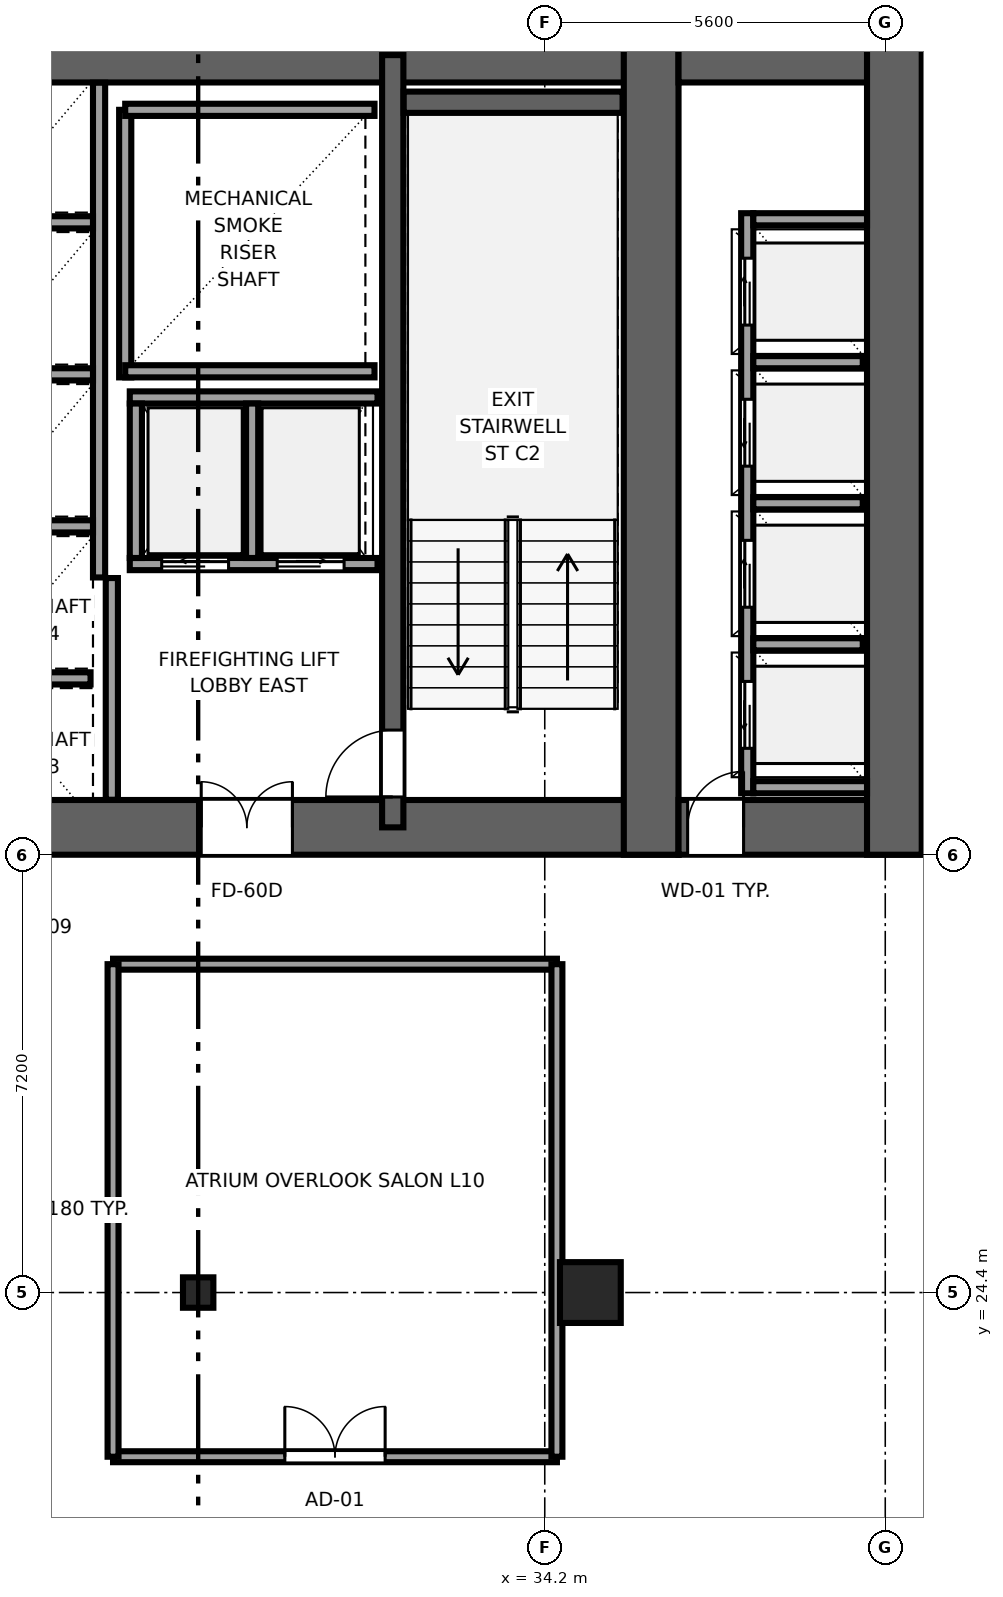
"""IFC4 building model, lengths in metres.
Left out: names, types, materials, properties, quantities, classifications, styles, units other than length and angle.
Written with IfcOpenShell. Run it as: python <this file> out.ifc"""

import sys

from ifc_helpers import new_model, si_unit, direction, frame, frame_2d, origin, origin_2d, place, context, subcontext, project, spatial, rectangle, i_section, extrude, source, transform, mapped, element, fill, save


model = new_model("IFC4")
c1 = context("Model", 3, precision=1e-05, world=origin(), true_north=direction((0.0, 1.0)))
c2 = subcontext(c1, "Body", "Model", "MODEL_VIEW")
j1 = project(units=[si_unit("LENGTHUNIT", "METRE"), si_unit("PLANEANGLEUNIT", "RADIAN")], contexts=[c1])
p1 = place(None, origin())
s1 = spatial("IfcSite", under=j1, at=p1, CompositionType="ELEMENT")
p2 = place(p1, origin())
s2 = spatial("IfcBuilding", under=s1, at=p2, CompositionType="ELEMENT")
p3 = place(p2, frame((0.0, 0.0, 46.2)))
s3 = spatial("IfcBuildingStorey", under=s2, at=p3, CompositionType="ELEMENT", Elevation=46.2)
p4 = place(p3, frame((9.6, 32.05, 0.0), z_axis=(0.0, 0.0, 1.0), x_axis=(1.0, 0.0, 0.0)))
e1 = element("IfcWall", 1, at=p4, inside=s3, PredefinedType="SHEAR", context=c2, shape_type="SweptSolid", body=[
    extrude(rectangle(XDim=26.8, YDim=0.9, at=frame_2d((13.4, 0.0))), origin(), (0.0, 0.0, 1.0), 3.55),
])
p5 = place(p4, frame((6.52, 0.0, 0.0), z_axis=(0.0, 0.0, 1.0), x_axis=(-1.0, 0.0, 0.0)))
e2 = element("IfcOpeningElement", 2, at=p5, cuts=e1, PredefinedType="OPENING", context=c2, shape_type="SweptSolid", body=[
    extrude(rectangle(XDim=1.5, YDim=2.04, at=frame_2d((0.75, 1.02))), frame((0.0, 0.46, 0.0), z_axis=(0.0, -1.0, 0.0), x_axis=(1.0, 0.0, 0.0)), (0.0, 0.0, 1.0), 0.92),
])
p6 = place(p4, frame((14.15, 0.0, 0.0), z_axis=(0.0, 0.0, 1.0), x_axis=(-1.0, 0.0, 0.0)))
e3 = element("IfcOpeningElement", 3, at=p6, cuts=e1, PredefinedType="OPENING", context=c2, shape_type="SweptSolid", body=[
    extrude(rectangle(XDim=1.5, YDim=2.04, at=frame_2d((0.75, 1.02))), frame((0.0, 0.46, 0.0), z_axis=(0.0, -1.0, 0.0), x_axis=(1.0, 0.0, 0.0)), (0.0, 0.0, 1.0), 0.92),
])
p7 = place(p4, frame((20.45, 0.0, 0.0), z_axis=(0.0, 0.0, 1.0), x_axis=(-1.0, 0.0, 0.0)))
e4 = element("IfcOpeningElement", 4, at=p7, cuts=e1, PredefinedType="OPENING", context=c2, shape_type="SweptSolid", body=[
    extrude(rectangle(XDim=1.5, YDim=2.04, at=frame_2d((0.75, 1.02))), frame((0.0, 0.46, 0.0), z_axis=(0.0, -1.0, 0.0), x_axis=(1.0, 0.0, 0.0)), (0.0, 0.0, 1.0), 0.92),
])
p8 = place(p4, frame((8.57, 0.0, 0.0), z_axis=(0.0, 0.0, 1.0), x_axis=(-1.0, 0.0, 0.0)))
e5 = element("IfcOpeningElement", 5, at=p8, cuts=e1, PredefinedType="OPENING", context=c2, shape_type="SweptSolid", body=[
    extrude(rectangle(XDim=0.82, YDim=2.01, at=frame_2d((0.41, 1.005))), frame((0.0, 0.46, 0.0), z_axis=(0.0, -1.0, 0.0), x_axis=(1.0, 0.0, 0.0)), (0.0, 0.0, 1.0), 0.92),
])
p9 = place(p3, frame((9.6, 44.75, 0.0), z_axis=(0.0, 0.0, 1.0), x_axis=(1.0, 0.0, 0.0)))
e6 = element("IfcWall", 6, at=p9, inside=s3, PredefinedType="SHEAR", context=c2, shape_type="SweptSolid", body=[
    extrude(rectangle(XDim=26.8, YDim=0.9, at=frame_2d((13.4, 0.0))), origin(), (0.0, 0.0, 1.0), 3.55),
])
p10 = place(p3, frame((35.95, 31.6, 0.0), z_axis=(0.0, 0.0, 1.0), x_axis=(0.0, 1.0, 0.0)))
e7 = element("IfcWall", 7, at=p10, inside=s3, PredefinedType="SHEAR", context=c2, shape_type="SweptSolid", body=[
    extrude(rectangle(XDim=13.6, YDim=0.9, at=frame_2d((6.8, 0.0))), origin(), (0.0, 0.0, 1.0), 3.55),
])
p11 = place(p3, frame((31.7, 32.05, 0.0), z_axis=(0.0, 0.0, 1.0), x_axis=(0.0, 1.0, 0.0)))
e8 = element("IfcWall", 8, at=p11, inside=s3, PredefinedType="SHEAR", context=c2, shape_type="SweptSolid", body=[
    extrude(rectangle(XDim=12.7, YDim=0.35, at=frame_2d((6.35, 0.0))), origin(), (0.0, 0.0, 1.0), 3.55),
])
p12 = place(p11, frame((1.6, 0.0, 0.0), z_axis=(0.0, 0.0, 1.0), x_axis=(-1.0, 0.0, 0.0)))
e9 = element("IfcOpeningElement", 9, at=p12, cuts=e8, PredefinedType="OPENING", context=c2, shape_type="SweptSolid", body=[
    extrude(rectangle(XDim=1.1, YDim=2.12, at=frame_2d((0.55, 1.06))), frame((0.0, 0.185, 0.0), z_axis=(0.0, -1.0, 0.0), x_axis=(1.0, 0.0, 0.0)), (0.0, 0.0, 1.0), 0.37),
])
p13 = place(p3, frame((36.4, 32.05, 0.0), z_axis=(0.0, 0.0, 1.0), x_axis=(1.0, 0.0, 0.0)))
e10 = element("IfcWall", 10, at=p13, inside=s3, PredefinedType="SHEAR", context=c2, shape_type="SweptSolid", body=[
    extrude(rectangle(XDim=4.0, YDim=0.9, at=frame_2d((2.0, 0.0))), origin(), (0.0, 0.0, 1.0), 3.55),
])
p14 = place(p13, frame((1.07, 0.0, 0.0), z_axis=(0.0, 0.0, 1.0), x_axis=(-1.0, 0.0, 0.0)))
e11 = element("IfcOpeningElement", 11, at=p14, cuts=e10, PredefinedType="OPENING", context=c2, shape_type="SweptSolid", body=[
    extrude(rectangle(XDim=0.92, YDim=2.01, at=frame_2d((0.46, 1.005))), frame((0.0, 0.46, 0.0), z_axis=(0.0, -1.0, 0.0), x_axis=(1.0, 0.0, 0.0)), (0.0, 0.0, 1.0), 0.92),
])
p15 = place(p3, frame((36.4, 44.75, 0.0), z_axis=(0.0, 0.0, 1.0), x_axis=(1.0, 0.0, 0.0)))
e12 = element("IfcWall", 12, at=p15, inside=s3, PredefinedType="SHEAR", context=c2, shape_type="SweptSolid", body=[
    extrude(rectangle(XDim=4.0, YDim=0.9, at=frame_2d((2.0, 0.0))), origin(), (0.0, 0.0, 1.0), 3.55),
])
p16 = place(p3, frame((39.95, 31.6, 0.0), z_axis=(0.0, 0.0, 1.0), x_axis=(0.0, 1.0, 0.0)))
e13 = element("IfcWall", 13, at=p16, inside=s3, PredefinedType="SHEAR", context=c2, shape_type="SweptSolid", body=[
    extrude(rectangle(XDim=13.6, YDim=0.9, at=frame_2d((6.8, 0.0))), origin(), (0.0, 0.0, 1.0), 3.55),
])
p17 = place(p3, frame((31.88, 43.975, 0.0), z_axis=(0.0, 0.0, 1.0), x_axis=(1.0, 0.0, 0.0)))
e14 = element("IfcWall", 14, at=p17, inside=s3, PredefinedType="SHEAR", context=c2, shape_type="SweptSolid", body=[
    extrude(rectangle(XDim=3.6, YDim=0.35, at=frame_2d((1.8, 0.0))), origin(), (0.0, 0.0, 1.0), 3.55),
])
m1 = source(origin(), c2, "Body", "SweptSolid", [
    extrude(rectangle(XDim=1.0, YDim=1.0, at=origin_2d()), origin(), (0.0, 0.0, 1.0), 3.55),
])
p18 = place(p3, frame((34.95, 24.4, 0.0), z_axis=(0.0, 0.0, 1.0), x_axis=(1.0, 0.0, 0.0)))
e15 = element("IfcColumn", 15, at=p18, inside=s3, PredefinedType="COLUMN", context=c2, shape_type="MappedRepresentation", body=[
    mapped(m1, transform((0.0, 0.0, 0.0), x_axis=(1.0, 0.0, 0.0), y_axis=(0.0, 1.0, 0.0), z_axis=(0.0, 0.0, 1.0), scale=1.0)),
])
m2 = source(origin(), c2, "Body", "SweptSolid", [
    extrude(i_section(OverallWidth=0.5, OverallDepth=0.5, WebThickness=0.028, FlangeThickness=0.045, at=origin_2d()), origin(), (0.0, 0.0, 1.0), 3.55),
])
p19 = place(p3, frame((28.5, 24.4, 0.0), z_axis=(0.0, 0.0, 1.0), x_axis=(1.0, 0.0, 0.0)))
e16 = element("IfcColumn", 16, at=p19, inside=s3, PredefinedType="COLUMN", context=c2, shape_type="MappedRepresentation", body=[
    mapped(m2, transform((0.0, 0.0, 0.0), x_axis=(1.0, 0.0, 0.0), y_axis=(0.0, 1.0, 0.0), z_axis=(0.0, 0.0, 1.0), scale=1.0)),
])
p20 = place(p3, frame((27.3, 39.45, 0.0), z_axis=(0.0, 0.0, 1.0), x_axis=(0.0, 1.0, 0.0)))
e17 = element("IfcWall", 17, at=p20, inside=s3, PredefinedType="SOLIDWALL", context=c2, shape_type="SweptSolid", body=[
    extrude(rectangle(XDim=4.4, YDim=0.2, at=frame_2d((2.2, 0.0))), origin(), (0.0, 0.0, 1.0), 3.37),
])
for number, where, z_axis, x_axis in (
    (18, (27.3, 39.55, 0.0), (0.0, 0.0, 1.0), (1.0, 0.0, 0.0)),
    (19, (27.3, 43.85, 0.0), (0.0, 0.0, 1.0), (1.0, 0.0, 0.0)),
):
    element("IfcWall", number, at=place(p3, frame(where, z_axis=z_axis, x_axis=x_axis)), inside=s3, PredefinedType="SOLIDWALL", context=c2, shape_type="SweptSolid", body=[
        extrude(rectangle(XDim=4.1, YDim=0.2, at=frame_2d((2.05, 0.0))), origin(), (0.0, 0.0, 1.0), 3.37),
    ])
p21 = place(p3, frame((27.08, 32.504, 0.0), z_axis=(0.0, 0.0, 1.0), x_axis=(0.0, 1.0, 0.0)))
e20 = element("IfcWall", 20, at=p21, inside=s3, PredefinedType="SOLIDWALL", context=c2, shape_type="SweptSolid", body=[
    extrude(rectangle(XDim=3.646, YDim=0.2, at=frame_2d((1.823, 0.0))), origin(), (0.0, 0.0, 1.0), 3.37),
])
p22 = place(p3, frame((27.375, 36.38, 0.0), z_axis=(0.0, 0.0, 1.0), x_axis=(1.0, 0.0, 0.0)))
e21 = element("IfcWall", 21, at=p22, inside=s3, PredefinedType="SOLIDWALL", context=c2, shape_type="SweptSolid", body=[
    extrude(rectangle(XDim=4.075, YDim=0.2, at=frame_2d((2.038, 0.0))), origin(), (0.0, 0.0, 1.0), 3.37),
])
p23 = place(p22, frame((0.525, 0.0, 0.0)))
e22 = element("IfcOpeningElement", 22, at=p23, cuts=e21, PredefinedType="OPENING", context=c2, shape_type="SweptSolid", body=[
    extrude(rectangle(XDim=1.1, YDim=2.12, at=frame_2d((0.55, 1.06))), frame((0.0, 0.11, 0.0), z_axis=(0.0, -1.0, 0.0), x_axis=(1.0, 0.0, 0.0)), (0.0, 0.0, 1.0), 0.22),
])
p24 = place(p22, frame((2.425, 0.0, 0.0)))
e23 = element("IfcOpeningElement", 23, at=p24, cuts=e21, PredefinedType="OPENING", context=c2, shape_type="SweptSolid", body=[
    extrude(rectangle(XDim=1.1, YDim=2.12, at=frame_2d((0.55, 1.06))), frame((0.0, 0.11, 0.0), z_axis=(0.0, -1.0, 0.0), x_axis=(1.0, 0.0, 0.0)), (0.0, 0.0, 1.0), 0.22),
])
p25 = place(p3, frame((27.375, 39.12, 0.0), z_axis=(0.0, 0.0, 1.0), x_axis=(1.0, 0.0, 0.0)))
e24 = element("IfcWall", 24, at=p25, inside=s3, PredefinedType="SOLIDWALL", context=c2, shape_type="SweptSolid", body=[
    extrude(rectangle(XDim=4.075, YDim=0.2, at=frame_2d((2.038, 0.0))), origin(), (0.0, 0.0, 1.0), 3.37),
])
for number, where, z_axis, x_axis in (
    (25, (27.475, 36.48, 0.0), (0.0, 0.0, 1.0), (0.0, 1.0, 0.0)),
    (26, (29.387, 36.48, 0.0), (0.0, 0.0, 1.0), (0.0, 1.0, 0.0)),
):
    element("IfcWall", number, at=place(p3, frame(where, z_axis=z_axis, x_axis=x_axis)), inside=s3, PredefinedType="SOLIDWALL", context=c2, shape_type="SweptSolid", body=[
        extrude(rectangle(XDim=2.54, YDim=0.2, at=frame_2d((1.27, 0.0))), origin(), (0.0, 0.0, 1.0), 3.37),
    ])
p26 = place(p3, frame((26.87, 36.16, 0.0), z_axis=(0.0, 0.0, 1.0), x_axis=(0.0, 1.0, 0.0)))
e27 = element("IfcWall", 27, at=p26, inside=s3, PredefinedType="SOLIDWALL", context=c2, shape_type="SweptSolid", body=[
    extrude(rectangle(XDim=8.136, YDim=0.2, at=frame_2d((4.068, 0.0))), origin(), (0.0, 0.0, 1.0), 3.37),
])
p27 = place(p3, frame((24.93, 34.5, 0.0), z_axis=(0.0, 0.0, 1.0), x_axis=(1.0, 0.0, 0.0)))
e28 = element("IfcWall", 28, at=p27, inside=s3, PredefinedType="SOLIDWALL", context=c2, shape_type="SweptSolid", body=[
    extrude(rectangle(XDim=1.8, YDim=0.2, at=frame_2d((0.9, 0.0))), origin(), (0.0, 0.0, 1.0), 3.37),
])
for number, where, z_axis, x_axis in (
    (29, (24.93, 37.0, 0.0), (0.0, 0.0, 1.0), (1.0, 0.0, 0.0)),
    (30, (24.93, 39.5, 0.0), (0.0, 0.0, 1.0), (1.0, 0.0, 0.0)),
    (31, (24.93, 42.0, 0.0), (0.0, 0.0, 1.0), (1.0, 0.0, 0.0)),
):
    element("IfcWall", number, at=place(p3, frame(where, z_axis=z_axis, x_axis=x_axis)), inside=s3, PredefinedType="SOLIDWALL", context=c2, shape_type="SweptSolid", body=[
        extrude(rectangle(XDim=1.84, YDim=0.2, at=frame_2d((0.92, 0.0))), origin(), (0.0, 0.0, 1.0), 3.37),
    ])
p28 = place(p3, frame((37.53, 32.61, 0.0), z_axis=(0.0, 0.0, 1.0), x_axis=(0.0, 1.0, 0.0)))
e32 = element("IfcWall", 32, at=p28, inside=s3, PredefinedType="SOLIDWALL", context=c2, shape_type="SweptSolid", body=[
    extrude(rectangle(XDim=9.54, YDim=0.2, at=frame_2d((4.77, 0.0))), origin(), (0.0, 0.0, 1.0), 3.37),
])
p29 = place(p28, frame((0.74, 0.0, 0.0)))
e33 = element("IfcOpeningElement", 33, at=p29, cuts=e32, PredefinedType="OPENING", context=c2, shape_type="SweptSolid", body=[
    extrude(rectangle(XDim=1.1, YDim=2.12, at=frame_2d((0.55, 1.06))), frame((0.0, 0.11, 0.0), z_axis=(0.0, -1.0, 0.0), x_axis=(1.0, 0.0, 0.0)), (0.0, 0.0, 1.0), 0.22),
])
p30 = place(p28, frame((3.06, 0.0, 0.0)))
e34 = element("IfcOpeningElement", 34, at=p30, cuts=e32, PredefinedType="OPENING", context=c2, shape_type="SweptSolid", body=[
    extrude(rectangle(XDim=1.1, YDim=2.12, at=frame_2d((0.55, 1.06))), frame((0.0, 0.11, 0.0), z_axis=(0.0, -1.0, 0.0), x_axis=(1.0, 0.0, 0.0)), (0.0, 0.0, 1.0), 0.22),
])
p31 = place(p28, frame((5.38, 0.0, 0.0)))
e35 = element("IfcOpeningElement", 35, at=p31, cuts=e32, PredefinedType="OPENING", context=c2, shape_type="SweptSolid", body=[
    extrude(rectangle(XDim=1.1, YDim=2.12, at=frame_2d((0.55, 1.06))), frame((0.0, 0.11, 0.0), z_axis=(0.0, -1.0, 0.0), x_axis=(1.0, 0.0, 0.0)), (0.0, 0.0, 1.0), 0.22),
])
p32 = place(p28, frame((7.7, 0.0, 0.0)))
e36 = element("IfcOpeningElement", 36, at=p32, cuts=e32, PredefinedType="OPENING", context=c2, shape_type="SweptSolid", body=[
    extrude(rectangle(XDim=1.1, YDim=2.12, at=frame_2d((0.55, 1.06))), frame((0.0, 0.11, 0.0), z_axis=(0.0, -1.0, 0.0), x_axis=(1.0, 0.0, 0.0)), (0.0, 0.0, 1.0), 0.22),
])
for number, where, z_axis, x_axis in (
    (37, (37.63, 32.71, 0.0), (0.0, 0.0, 1.0), (1.0, 0.0, 0.0)),
    (38, (37.63, 42.05, 0.0), (0.0, 0.0, 1.0), (1.0, 0.0, 0.0)),
):
    element("IfcWall", number, at=place(p3, frame(where, z_axis=z_axis, x_axis=x_axis)), inside=s3, PredefinedType="SOLIDWALL", context=c2, shape_type="SweptSolid", body=[
        extrude(rectangle(XDim=1.87, YDim=0.2, at=frame_2d((0.935, 0.0))), origin(), (0.0, 0.0, 1.0), 3.37),
    ])
for number, where, z_axis, x_axis in (
    (39, (37.63, 35.06, 0.0), (0.0, 0.0, 1.0), (1.0, 0.0, 0.0)),
    (40, (37.63, 37.38, 0.0), (0.0, 0.0, 1.0), (1.0, 0.0, 0.0)),
    (41, (37.63, 39.7, 0.0), (0.0, 0.0, 1.0), (1.0, 0.0, 0.0)),
):
    element("IfcWall", number, at=place(p3, frame(where, z_axis=z_axis, x_axis=x_axis)), inside=s3, PredefinedType="SOLIDWALL", context=c2, shape_type="SweptSolid", body=[
        extrude(rectangle(XDim=1.8, YDim=0.2, at=frame_2d((0.9, 0.0))), origin(), (0.0, 0.0, 1.0), 3.37),
    ])
p33 = place(p3, frame((27.1, 21.7, 0.0), z_axis=(0.0, 0.0, 1.0), x_axis=(1.0, 0.0, 0.0)))
e42 = element("IfcWall", 42, at=p33, inside=s3, PredefinedType="PARTITIONING", context=c2, shape_type="SweptSolid", body=[
    extrude(rectangle(XDim=7.3, YDim=0.18, at=frame_2d((3.65, 0.0))), origin(), (0.0, 0.0, 1.0), 3.37),
])
p34 = place(p33, frame((2.825, 0.0, 0.0)))
e43 = element("IfcOpeningElement", 43, at=p34, cuts=e42, PredefinedType="OPENING", context=c2, shape_type="SweptSolid", body=[
    extrude(rectangle(XDim=1.65, YDim=2.15, at=frame_2d((0.825, 1.075))), frame((0.0, 0.1, 0.0), z_axis=(0.0, -1.0, 0.0), x_axis=(1.0, 0.0, 0.0)), (0.0, 0.0, 1.0), 0.2),
])
p35 = place(p3, frame((27.1, 29.8, 0.0), z_axis=(0.0, 0.0, 1.0), x_axis=(1.0, 0.0, 0.0)))
e44 = element("IfcWall", 44, at=p35, inside=s3, PredefinedType="PARTITIONING", context=c2, shape_type="SweptSolid", body=[
    extrude(rectangle(XDim=7.3, YDim=0.18, at=frame_2d((3.65, 0.0))), origin(), (0.0, 0.0, 1.0), 3.37),
])
for number, where, z_axis, x_axis in (
    (45, (27.1, 21.7, 0.0), (0.0, 0.0, 1.0), (0.0, 1.0, 0.0)),
    (46, (34.4, 21.7, 0.0), (0.0, 0.0, 1.0), (0.0, 1.0, 0.0)),
):
    element("IfcWall", number, at=place(p3, frame(where, z_axis=z_axis, x_axis=x_axis)), inside=s3, PredefinedType="PARTITIONING", context=c2, shape_type="SweptSolid", body=[
        extrude(rectangle(XDim=8.1, YDim=0.18, at=frame_2d((4.05, 0.0))), origin(), (0.0, 0.0, 1.0), 3.37),
    ])
m3 = source(origin(), c2, "Body", "SweptSolid", [
    extrude(rectangle(XDim=1.1, YDim=2.12, at=frame_2d((0.55, 1.06))), frame((0.0, 0.025, 0.0), z_axis=(0.0, -1.0, 0.0), x_axis=(1.0, 0.0, 0.0)), (0.0, 0.0, 1.0), 0.05),
])
p36 = place(p12, origin())
e47 = element("IfcDoor", 47, at=p36, inside=s3, OperationType="SINGLE_SWING_LEFT", PredefinedType="DOOR", context=c2, shape_type="MappedRepresentation", body=[
    mapped(m3, transform((0.0, 0.0, 0.0), x_axis=(1.0, 0.0, 0.0), y_axis=(0.0, 1.0, 0.0), z_axis=(0.0, 0.0, 1.0), scale=1.0)),
])
fill(e9, e47)
m4 = source(origin(), c2, "Body", "SweptSolid", [
    extrude(rectangle(XDim=1.5, YDim=2.04, at=frame_2d((0.75, 1.02))), frame((0.0, 0.025, 0.0), z_axis=(0.0, -1.0, 0.0), x_axis=(1.0, 0.0, 0.0)), (0.0, 0.0, 1.0), 0.05),
])
p37 = place(p7, origin())
e48 = element("IfcDoor", 48, at=p37, inside=s3, OperationType="DOUBLE_DOOR_SINGLE_SWING", PredefinedType="DOOR", context=c2, shape_type="MappedRepresentation", body=[
    mapped(m4, transform((0.0, 0.0, 0.0), x_axis=(1.0, 0.0, 0.0), y_axis=(0.0, 1.0, 0.0), z_axis=(0.0, 0.0, 1.0), scale=1.0)),
])
fill(e4, e48)
m5 = source(origin(), c2, "Body", "SweptSolid", [
    extrude(rectangle(XDim=0.92, YDim=2.01, at=frame_2d((0.46, 1.005))), frame((0.0, 0.025, 0.0), z_axis=(0.0, -1.0, 0.0), x_axis=(1.0, 0.0, 0.0)), (0.0, 0.0, 1.0), 0.05),
])
p38 = place(p14, origin())
e49 = element("IfcDoor", 49, at=p38, inside=s3, OperationType="SINGLE_SWING_RIGHT", PredefinedType="DOOR", context=c2, shape_type="MappedRepresentation", body=[
    mapped(m5, transform((0.0, 0.0, 0.0), x_axis=(1.0, 0.0, 0.0), y_axis=(0.0, 1.0, 0.0), z_axis=(0.0, 0.0, 1.0), scale=1.0)),
])
fill(e11, e49)
m6 = source(origin(), c2, "Body", "SweptSolid", [
    extrude(rectangle(XDim=1.1, YDim=2.12, at=frame_2d((0.55, 1.06))), frame((0.0, 0.025, 0.0), z_axis=(0.0, -1.0, 0.0), x_axis=(1.0, 0.0, 0.0)), (0.0, 0.0, 1.0), 0.05),
])
p39 = place(p23, origin())
e50 = element("IfcDoor", 50, at=p39, inside=s3, OperationType="SLIDING_TO_LEFT", PredefinedType="DOOR", context=c2, shape_type="MappedRepresentation", body=[
    mapped(m6, transform((0.0, 0.0, 0.0), x_axis=(1.0, 0.0, 0.0), y_axis=(0.0, 1.0, 0.0), z_axis=(0.0, 0.0, 1.0), scale=1.0)),
])
fill(e22, e50)
p40 = place(p24, origin())
e51 = element("IfcDoor", 51, at=p40, inside=s3, OperationType="SLIDING_TO_RIGHT", PredefinedType="DOOR", context=c2, shape_type="MappedRepresentation", body=[
    mapped(m6, transform((0.0, 0.0, 0.0), x_axis=(1.0, 0.0, 0.0), y_axis=(0.0, 1.0, 0.0), z_axis=(0.0, 0.0, 1.0), scale=1.0)),
])
fill(e23, e51)
p41 = place(p29, origin())
e52 = element("IfcDoor", 52, at=p41, inside=s3, OperationType="SLIDING_TO_LEFT", PredefinedType="DOOR", context=c2, shape_type="MappedRepresentation", body=[
    mapped(m6, transform((0.0, 0.0, 0.0), x_axis=(1.0, 0.0, 0.0), y_axis=(0.0, 1.0, 0.0), z_axis=(0.0, 0.0, 1.0), scale=1.0)),
])
fill(e33, e52)
p42 = place(p30, origin())
e53 = element("IfcDoor", 53, at=p42, inside=s3, OperationType="SLIDING_TO_RIGHT", PredefinedType="DOOR", context=c2, shape_type="MappedRepresentation", body=[
    mapped(m6, transform((0.0, 0.0, 0.0), x_axis=(1.0, 0.0, 0.0), y_axis=(0.0, 1.0, 0.0), z_axis=(0.0, 0.0, 1.0), scale=1.0)),
])
fill(e34, e53)
p43 = place(p31, origin())
e54 = element("IfcDoor", 54, at=p43, inside=s3, OperationType="SLIDING_TO_LEFT", PredefinedType="DOOR", context=c2, shape_type="MappedRepresentation", body=[
    mapped(m6, transform((0.0, 0.0, 0.0), x_axis=(1.0, 0.0, 0.0), y_axis=(0.0, 1.0, 0.0), z_axis=(0.0, 0.0, 1.0), scale=1.0)),
])
fill(e35, e54)
p44 = place(p32, origin())
e55 = element("IfcDoor", 55, at=p44, inside=s3, OperationType="SLIDING_TO_RIGHT", PredefinedType="DOOR", context=c2, shape_type="MappedRepresentation", body=[
    mapped(m6, transform((0.0, 0.0, 0.0), x_axis=(1.0, 0.0, 0.0), y_axis=(0.0, 1.0, 0.0), z_axis=(0.0, 0.0, 1.0), scale=1.0)),
])
fill(e36, e55)
m7 = source(origin(), c2, "Body", "SweptSolid", [
    extrude(rectangle(XDim=1.65, YDim=2.15, at=frame_2d((0.825, 1.075))), frame((0.0, 0.025, 0.0), z_axis=(0.0, -1.0, 0.0), x_axis=(1.0, 0.0, 0.0)), (0.0, 0.0, 1.0), 0.05),
])
p45 = place(p34, origin())
e56 = element("IfcDoor", 56, at=p45, inside=s3, OperationType="DOUBLE_DOOR_SINGLE_SWING", PredefinedType="DOOR", context=c2, shape_type="MappedRepresentation", body=[
    mapped(m7, transform((0.0, 0.0, 0.0), x_axis=(1.0, 0.0, 0.0), y_axis=(0.0, 1.0, 0.0), z_axis=(0.0, 0.0, 1.0), scale=1.0)),
])
fill(e43, e56)
save(model, sys.argv[1])
